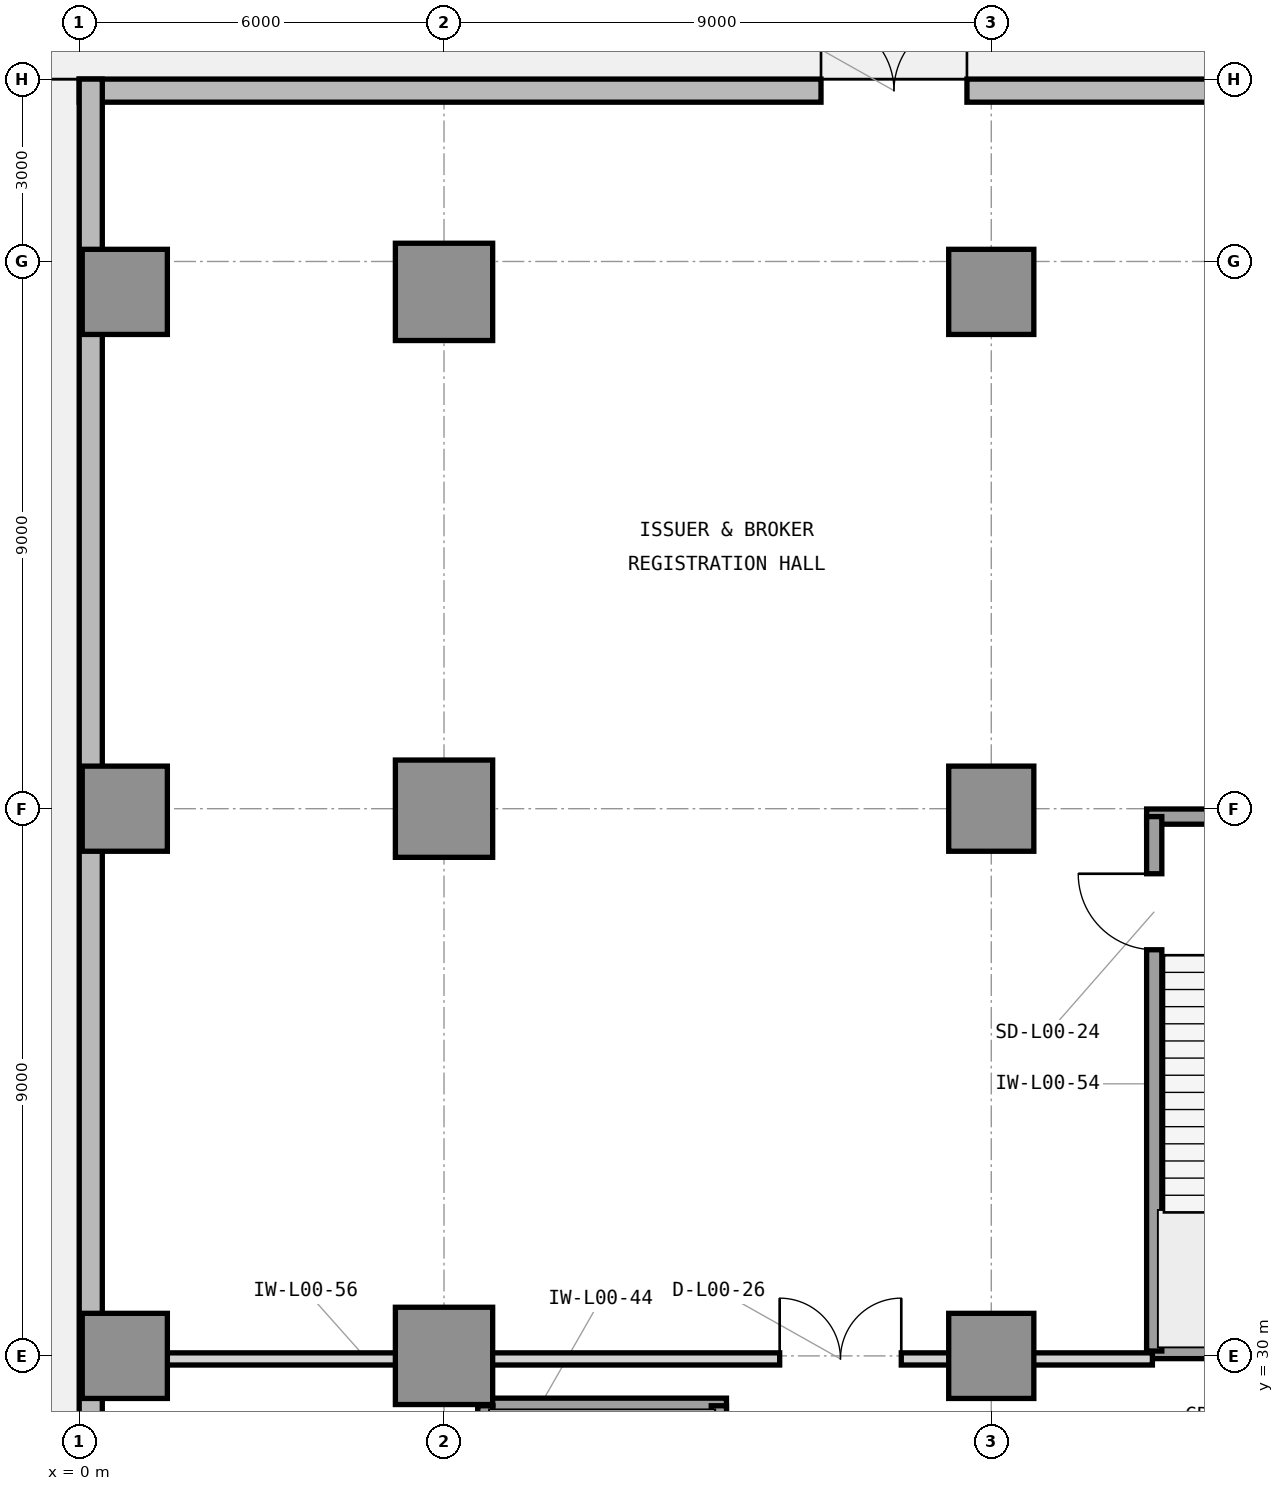
"""IFC4 building model, lengths in metres.
Left out: names, types, materials, properties, quantities, classifications, styles, units other than length and angle.
Written with IfcOpenShell. Run it as: python <this file> out.ifc"""

import sys

from ifc_helpers import new_model, si_unit, direction, frame, frame_2d, origin, origin_2d, place, context, subcontext, project, spatial, rectangle, extrude, element, fill, save


model = new_model("IFC4")
c1 = context("Model", 3, precision=1e-05, world=origin(), true_north=direction((0.0, 1.0)))
c2 = subcontext(c1, "Body", "Model", "MODEL_VIEW")
j1 = project(units=[si_unit("LENGTHUNIT", "METRE"), si_unit("PLANEANGLEUNIT", "RADIAN")], contexts=[c1])
p1 = place(None, origin())
s1 = spatial("IfcSite", under=j1, at=p1, CompositionType="ELEMENT")
p2 = place(p1, origin())
s2 = spatial("IfcBuilding", under=s1, at=p2, CompositionType="ELEMENT")
p3 = place(p2, origin())
s3 = spatial("IfcBuildingStorey", under=s2, at=p3, CompositionType="ELEMENT", Elevation=0.0)
for number, where, z_axis, x_axis in (
    (1, (0.75, 30.0, 0.0), (0.0, 0.0, 1.0), (1.0, 0.0, 0.0)),
    (2, (0.75, 39.0, 0.0), (0.0, 0.0, 1.0), (1.0, 0.0, 0.0)),
    (3, (0.75, 47.5, 0.0), (0.0, 0.0, 1.0), (1.0, 0.0, 0.0)),
):
    element("IfcColumn", number, at=place(p3, frame(where, z_axis=z_axis, x_axis=x_axis)), inside=s3, PredefinedType="COLUMN", context=c2, shape_type="SweptSolid", body=[
        extrude(rectangle(XDim=1.4, YDim=1.4, at=origin_2d()), origin(), (0.0, 0.0, 1.0), 5.4),
    ])
for number, where, z_axis, x_axis in (
    (4, (6.0, 30.0, 0.0), (0.0, 0.0, 1.0), (1.0, 0.0, 0.0)),
    (5, (6.0, 39.0, 0.0), (0.0, 0.0, 1.0), (1.0, 0.0, 0.0)),
    (6, (6.0, 47.5, 0.0), (0.0, 0.0, 1.0), (1.0, 0.0, 0.0)),
):
    element("IfcColumn", number, at=place(p3, frame(where, z_axis=z_axis, x_axis=x_axis)), inside=s3, PredefinedType="COLUMN", context=c2, shape_type="SweptSolid", body=[
        extrude(rectangle(XDim=1.6, YDim=1.6, at=origin_2d()), origin(), (0.0, 0.0, 1.0), 5.4),
    ])
for number, where, z_axis, x_axis in (
    (7, (15.0, 30.0, 0.0), (0.0, 0.0, 1.0), (1.0, 0.0, 0.0)),
    (8, (15.0, 39.0, 0.0), (0.0, 0.0, 1.0), (1.0, 0.0, 0.0)),
    (9, (15.0, 47.5, 0.0), (0.0, 0.0, 1.0), (1.0, 0.0, 0.0)),
):
    element("IfcColumn", number, at=place(p3, frame(where, z_axis=z_axis, x_axis=x_axis)), inside=s3, PredefinedType="COLUMN", context=c2, shape_type="SweptSolid", body=[
        extrude(rectangle(XDim=1.4, YDim=1.4, at=origin_2d()), origin(), (0.0, 0.0, 1.0), 5.4),
    ])
p4 = place(p3, frame((34.28, 50.81, 0.0), z_axis=(0.0, 0.0, 1.0), x_axis=(-1.0, 0.0, 0.0)))
e10 = element("IfcWall", 10, at=p4, inside=s3, PredefinedType="STANDARD", context=c2, shape_type="SweptSolid", body=[
    extrude(rectangle(XDim=34.28, YDim=0.38, at=frame_2d((17.14, 0.0))), origin(), (0.0, 0.0, 1.0), 5.1),
])
p5 = place(p4, frame((19.68, 0.0, 0.0)))
e11 = element("IfcOpeningElement", 11, at=p5, cuts=e10, PredefinedType="OPENING", context=c2, shape_type="SweptSolid", body=[
    extrude(rectangle(XDim=2.4, YDim=2.8, at=frame_2d((1.2, 1.4))), frame((0.0, 0.2, 0.0), z_axis=(0.0, -1.0, 0.0), x_axis=(1.0, 0.0, 0.0)), (0.0, 0.0, 1.0), 0.4),
])
p6 = place(p4, frame((5.746, 0.0, 0.9)))
e12 = element("IfcOpeningElement", 12, at=p6, cuts=e10, PredefinedType="OPENING", context=c2, shape_type="SweptSolid", body=[
    extrude(rectangle(XDim=3.2, YDim=3.1, at=frame_2d((1.6, 1.55))), frame((0.0, 0.2, 0.0), z_axis=(0.0, -1.0, 0.0), x_axis=(1.0, 0.0, 0.0)), (0.0, 0.0, 1.0), 0.4),
])
p7 = place(p3, frame((0.19, 51.0, 0.0), z_axis=(0.0, 0.0, 1.0), x_axis=(0.0, -1.0, 0.0)))
e13 = element("IfcWall", 13, at=p7, inside=s3, PredefinedType="STANDARD", context=c2, shape_type="SweptSolid", body=[
    extrude(rectangle(XDim=48.0, YDim=0.38, at=frame_2d((24.0, 0.0))), origin(), (0.0, 0.0, 1.0), 5.1),
])
p8 = place(p7, frame((33.6, 0.0, 0.0)))
e14 = element("IfcOpeningElement", 14, at=p8, cuts=e13, PredefinedType="OPENING", context=c2, shape_type="SweptSolid", body=[
    extrude(rectangle(XDim=2.4, YDim=2.8, at=frame_2d((1.2, 1.4))), frame((0.0, 0.2, 0.0), z_axis=(0.0, -1.0, 0.0), x_axis=(1.0, 0.0, 0.0)), (0.0, 0.0, 1.0), 0.4),
])
p9 = place(p7, frame((40.05, 0.0, 0.0)))
e15 = element("IfcOpeningElement", 15, at=p9, cuts=e13, PredefinedType="OPENING", context=c2, shape_type="SweptSolid", body=[
    extrude(rectangle(XDim=1.9, YDim=2.4, at=frame_2d((0.95, 1.2))), frame((0.0, 0.2, 0.0), z_axis=(0.0, -1.0, 0.0), x_axis=(1.0, 0.0, 0.0)), (0.0, 0.0, 1.0), 0.4),
])
p10 = place(p7, frame((44.4, 0.0, 1.0)))
e16 = element("IfcOpeningElement", 16, at=p10, cuts=e13, PredefinedType="OPENING", context=c2, shape_type="SweptSolid", body=[
    extrude(rectangle(XDim=2.4, YDim=2.9, at=frame_2d((1.2, 1.45))), frame((0.0, 0.2, 0.0), z_axis=(0.0, -1.0, 0.0), x_axis=(1.0, 0.0, 0.0)), (0.0, 0.0, 1.0), 0.4),
])
p11 = place(p3, frame((6.555, 29.18, 0.0), z_axis=(0.0, 0.0, 1.0), x_axis=(1.0, 0.0, 0.0)))
e17 = element("IfcWall", 17, at=p11, inside=s3, PredefinedType="SHEAR", context=c2, shape_type="SweptSolid", body=[
    extrude(rectangle(XDim=4.09, YDim=0.25, at=frame_2d((2.045, 0.0))), origin(), (0.0, 0.0, 1.0), 5.4),
])
p12 = place(p3, frame((6.68, 21.68, 0.0), z_axis=(0.0, 0.0, 1.0), x_axis=(0.0, 1.0, 0.0)))
e18 = element("IfcWall", 18, at=p12, inside=s3, PredefinedType="SHEAR", context=c2, shape_type="SweptSolid", body=[
    extrude(rectangle(XDim=7.5, YDim=0.25, at=frame_2d((3.75, 0.0))), origin(), (0.0, 0.0, 1.0), 5.4),
])
p13 = place(p3, frame((10.52, 21.68, 0.0), z_axis=(0.0, 0.0, 1.0), x_axis=(0.0, 1.0, 0.0)))
e19 = element("IfcWall", 19, at=p13, inside=s3, PredefinedType="SHEAR", context=c2, shape_type="SweptSolid", body=[
    extrude(rectangle(XDim=7.5, YDim=0.25, at=frame_2d((3.75, 0.0))), origin(), (0.0, 0.0, 1.0), 5.4),
])
p14 = place(p13, frame((6.02, 0.0, 0.0)))
e20 = element("IfcOpeningElement", 20, at=p14, cuts=e19, PredefinedType="OPENING", context=c2, shape_type="SweptSolid", body=[
    extrude(rectangle(XDim=1.25, YDim=2.2, at=frame_2d((0.625, 1.1))), frame((0.0, 0.135, 0.0), z_axis=(0.0, -1.0, 0.0), x_axis=(1.0, 0.0, 0.0)), (0.0, 0.0, 1.0), 0.27),
])
for number, where, z_axis, x_axis in (
    (21, (17.555, 30.08, 0.0), (0.0, 0.0, 1.0), (1.0, 0.0, 0.0)),
    (22, (17.555, 38.87, 0.0), (0.0, 0.0, 1.0), (1.0, 0.0, 0.0)),
):
    element("IfcWall", number, at=place(p3, frame(where, z_axis=z_axis, x_axis=x_axis)), inside=s3, PredefinedType="SHEAR", context=c2, shape_type="SweptSolid", body=[
        extrude(rectangle(XDim=5.29, YDim=0.25, at=frame_2d((2.645, 0.0))), origin(), (0.0, 0.0, 1.0), 5.4),
    ])
p15 = place(p3, frame((17.68, 30.08, 0.0), z_axis=(0.0, 0.0, 1.0), x_axis=(0.0, 1.0, 0.0)))
e23 = element("IfcWall", 23, at=p15, inside=s3, PredefinedType="SHEAR", context=c2, shape_type="SweptSolid", body=[
    extrude(rectangle(XDim=8.79, YDim=0.25, at=frame_2d((4.395, 0.0))), origin(), (0.0, 0.0, 1.0), 5.4),
])
p16 = place(p15, frame((6.6, 0.0, 0.0)))
e24 = element("IfcOpeningElement", 24, at=p16, cuts=e23, PredefinedType="OPENING", context=c2, shape_type="SweptSolid", body=[
    extrude(rectangle(XDim=1.25, YDim=2.2, at=frame_2d((0.625, 1.1))), frame((0.0, 0.135, 0.0), z_axis=(0.0, -1.0, 0.0), x_axis=(1.0, 0.0, 0.0)), (0.0, 0.0, 1.0), 0.27),
])
p17 = place(p3, frame((0.42, 29.95, 0.0), z_axis=(0.0, 0.0, 1.0), x_axis=(1.0, 0.0, 0.0)))
e25 = element("IfcWall", 25, at=p17, inside=s3, PredefinedType="PARTITIONING", context=c2, shape_type="SweptSolid", body=[
    extrude(rectangle(XDim=17.23, YDim=0.2, at=frame_2d((8.615, 0.0))), origin(), (0.0, 0.0, 1.0), 4.234),
])
p18 = place(p17, frame((11.1, 0.0, 0.0)))
e26 = element("IfcOpeningElement", 26, at=p18, cuts=e25, PredefinedType="OPENING", context=c2, shape_type="SweptSolid", body=[
    extrude(rectangle(XDim=2.0, YDim=2.5, at=frame_2d((1.0, 1.25))), frame((0.0, 0.11, 0.0), z_axis=(0.0, -1.0, 0.0), x_axis=(1.0, 0.0, 0.0)), (0.0, 0.0, 1.0), 0.22),
])
p19 = place(p5, frame((2.4, 0.0, 0.0), z_axis=(0.0, 0.0, 1.0), x_axis=(-1.0, 0.0, 0.0)))
e27 = element("IfcDoor", 27, at=p19, inside=s3, OperationType="DOUBLE_DOOR_SINGLE_SWING", PredefinedType="DOOR", context=c2, shape_type="SweptSolid", body=[
    extrude(rectangle(XDim=2.4, YDim=2.8, at=frame_2d((1.2, 1.4))), frame((0.0, 0.025, 0.0), z_axis=(0.0, -1.0, 0.0), x_axis=(1.0, 0.0, 0.0)), (0.0, 0.0, 1.0), 0.05),
])
fill(e11, e27)
p20 = place(p16, origin())
e28 = element("IfcDoor", 28, at=p20, inside=s3, OperationType="SINGLE_SWING_RIGHT", PredefinedType="DOOR", context=c2, shape_type="SweptSolid", body=[
    extrude(rectangle(XDim=1.25, YDim=2.2, at=frame_2d((0.625, 1.1))), frame((0.0, 0.025, 0.0), z_axis=(0.0, -1.0, 0.0), x_axis=(1.0, 0.0, 0.0)), (0.0, 0.0, 1.0), 0.05),
])
fill(e24, e28)
p21 = place(p18, origin())
e29 = element("IfcDoor", 29, at=p21, inside=s3, OperationType="DOUBLE_DOOR_SINGLE_SWING", PredefinedType="DOOR", context=c2, shape_type="SweptSolid", body=[
    extrude(rectangle(XDim=2.0, YDim=2.5, at=frame_2d((1.0, 1.25))), frame((0.0, 0.025, 0.0), z_axis=(0.0, -1.0, 0.0), x_axis=(1.0, 0.0, 0.0)), (0.0, 0.0, 1.0), 0.05),
])
fill(e26, e29)
save(model, sys.argv[1])
